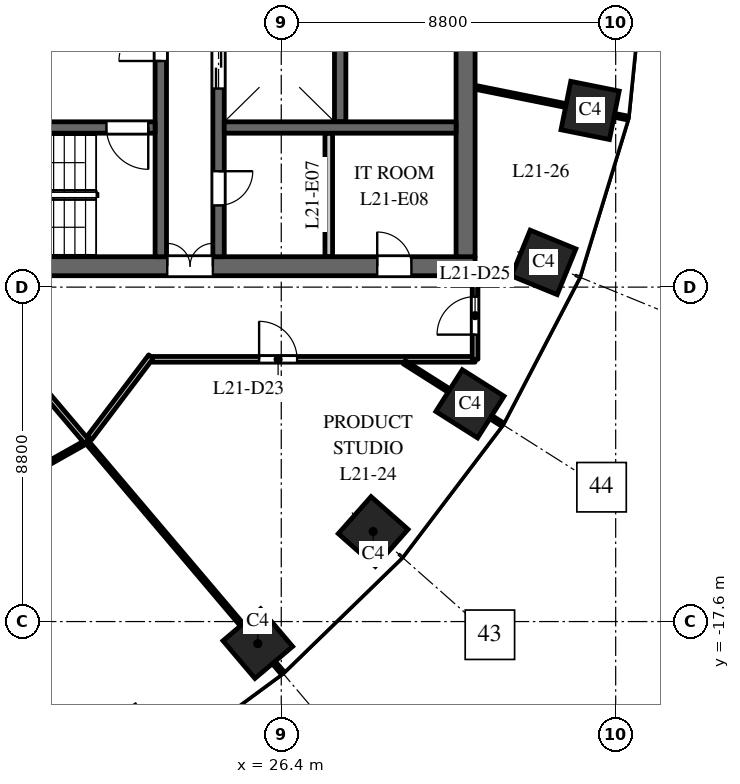
"""IFC4 building model, lengths in metres.
Left out: names, types, materials, properties, quantities, classifications, styles, units other than length and angle.
Written with IfcOpenShell. Run it as: python <this file> out.ifc"""

import sys

from ifc_helpers import new_model, si_unit, direction, frame, frame_2d, origin, origin_2d, place, context, subcontext, project, spatial, rectangle, extrude, element, fill, save


model = new_model("IFC4")
c1 = context("Model", 3, precision=1e-05, world=origin(), true_north=direction((0.0, 1.0)))
c2 = subcontext(c1, "Body", "Model", "MODEL_VIEW")
j1 = project(units=[si_unit("LENGTHUNIT", "METRE"), si_unit("PLANEANGLEUNIT", "RADIAN")], contexts=[c1])
p1 = place(None, origin())
s1 = spatial("IfcSite", under=j1, at=p1, CompositionType="ELEMENT")
p2 = place(p1, origin())
s2 = spatial("IfcBuilding", under=s1, at=p2, CompositionType="ELEMENT")
p3 = place(p2, frame((0.0, 0.0, 96.0)))
s3 = spatial("IfcBuildingStorey", under=s2, at=p3, CompositionType="ELEMENT", Elevation=96.0)
for number, where, z_axis, x_axis in (
    (1, (25.783, -18.18, 0.0), (0.0, 0.0, 1.0), (0.763, 0.646, 0.0)),
    (2, (28.819, -15.23, 0.0), (0.0, 0.0, 1.0), (0.663, 0.749, 0.0)),
    (3, (31.365, -11.871, 0.0), (0.0, 0.0, 1.0), (0.535, 0.845, 0.0)),
    (4, (33.305, -8.149, 0.0), (0.0, 0.0, 1.0), (0.379, 0.925, 0.0)),
    (5, (34.527, -4.151, 0.0), (0.0, 0.0, 1.0), (0.197, 0.98, 0.0)),
):
    element("IfcColumn", number, at=place(p3, frame(where, z_axis=z_axis, x_axis=x_axis)), inside=s3, PredefinedType="COLUMN", context=c2, shape_type="SweptSolid", body=[
        extrude(rectangle(XDim=1.3, YDim=1.3, at=origin_2d()), origin(), (0.0, 0.0, 1.0), 4.0),
    ])
p4 = place(p3, frame((16.5, -8.25, 0.0), z_axis=(0.0, 0.0, 1.0), x_axis=(1.0, 0.0, 0.0)))
e6 = element("IfcWall", 6, at=p4, inside=s3, PredefinedType="SHEAR", context=c2, shape_type="SweptSolid", body=[
    extrude(rectangle(XDim=15.0, YDim=0.5, at=frame_2d((7.5, 0.0))), origin(), (0.0, 0.0, 1.0), 3.7),
])
p5 = place(p4, frame((6.9, 0.0, 0.0)))
e7 = element("IfcOpeningElement", 7, at=p5, cuts=e6, PredefinedType="OPENING", context=c2, shape_type="SweptSolid", body=[
    extrude(rectangle(XDim=1.2, YDim=2.1, at=frame_2d((0.6, 1.05))), frame((0.0, 0.26, 0.0), z_axis=(0.0, -1.0, 0.0), x_axis=(1.0, 0.0, 0.0)), (0.0, 0.0, 1.0), 0.52),
])
p6 = place(p4, frame((12.425, 0.0, 0.0)))
e8 = element("IfcOpeningElement", 8, at=p6, cuts=e6, PredefinedType="OPENING", context=c2, shape_type="SweptSolid", body=[
    extrude(rectangle(XDim=0.9, YDim=2.1, at=frame_2d((0.45, 1.05))), frame((0.0, 0.26, 0.0), z_axis=(0.0, -1.0, 0.0), x_axis=(1.0, 0.0, 0.0)), (0.0, 0.0, 1.0), 0.52),
])
p7 = place(p3, frame((27.95, -4.45, 0.0), z_axis=(0.0, 0.0, 1.0), x_axis=(0.0, 1.0, 0.0)))
e9 = element("IfcWall", 9, at=p7, inside=s3, PredefinedType="SHEAR", context=c2, shape_type="SweptSolid", body=[
    extrude(rectangle(XDim=8.9, YDim=0.3, at=frame_2d((4.45, 0.0))), origin(), (0.0, 0.0, 1.0), 3.7),
])
p8 = place(p3, frame((24.75, -8.0, 0.0), z_axis=(0.0, 0.0, 1.0), x_axis=(0.0, 1.0, 0.0)))
e10 = element("IfcWall", 10, at=p8, inside=s3, PredefinedType="SHEAR", context=c2, shape_type="SweptSolid", body=[
    extrude(rectangle(XDim=16.0, YDim=0.3, at=frame_2d((8.0, 0.0))), origin(), (0.0, 0.0, 1.0), 3.7),
])
p9 = place(p8, frame((4.425, 0.0, 0.0)))
e11 = element("IfcOpeningElement", 11, at=p9, cuts=e10, PredefinedType="OPENING", context=c2, shape_type="SweptSolid", body=[
    extrude(rectangle(XDim=1.1, YDim=2.1, at=frame_2d((0.55, 1.05))), frame((0.0, 0.16, 0.0), z_axis=(0.0, -1.0, 0.0), x_axis=(1.0, 0.0, 0.0)), (0.0, 0.0, 1.0), 0.32),
])
p10 = place(p8, frame((7.45, 0.0, 0.0)))
e12 = element("IfcOpeningElement", 12, at=p10, cuts=e10, PredefinedType="OPENING", context=c2, shape_type="SweptSolid", body=[
    extrude(rectangle(XDim=1.1, YDim=2.1, at=frame_2d((0.55, 1.05))), frame((0.0, 0.16, 0.0), z_axis=(0.0, -1.0, 0.0), x_axis=(1.0, 0.0, 0.0)), (0.0, 0.0, 1.0), 0.32),
])
p11 = place(p8, frame((10.425, 0.0, 0.0)))
e13 = element("IfcOpeningElement", 13, at=p11, cuts=e10, PredefinedType="OPENING", context=c2, shape_type="SweptSolid", body=[
    extrude(rectangle(XDim=1.2, YDim=2.1, at=frame_2d((0.6, 1.05))), frame((0.0, 0.16, 0.0), z_axis=(0.0, -1.0, 0.0), x_axis=(1.0, 0.0, 0.0)), (0.0, 0.0, 1.0), 0.32),
])
p12 = place(p8, frame((13.75, 0.0, 0.0)))
e14 = element("IfcOpeningElement", 14, at=p12, cuts=e10, PredefinedType="OPENING", context=c2, shape_type="SweptSolid", body=[
    extrude(rectangle(XDim=0.9, YDim=2.1, at=frame_2d((0.45, 1.05))), frame((0.0, 0.16, 0.0), z_axis=(0.0, -1.0, 0.0), x_axis=(1.0, 0.0, 0.0)), (0.0, 0.0, 1.0), 0.32),
])
p13 = place(p8, frame((1.35, 0.0, 0.0)))
e15 = element("IfcOpeningElement", 15, at=p13, cuts=e10, PredefinedType="OPENING", context=c2, shape_type="SweptSolid", body=[
    extrude(rectangle(XDim=0.9, YDim=2.1, at=frame_2d((0.45, 1.05))), frame((0.0, 0.16, 0.0), z_axis=(0.0, -1.0, 0.0), x_axis=(1.0, 0.0, 0.0)), (0.0, 0.0, 1.0), 0.32),
])
p14 = place(p3, frame((31.25, -8.0, 0.0), z_axis=(0.0, 0.0, 1.0), x_axis=(0.0, 1.0, 0.0)))
e16 = element("IfcWall", 16, at=p14, inside=s3, PredefinedType="SHEAR", context=c2, shape_type="SweptSolid", body=[
    extrude(rectangle(XDim=16.0, YDim=0.5, at=frame_2d((8.0, 0.0))), origin(), (0.0, 0.0, 1.0), 3.7),
])
p15 = place(p3, frame((27.65, -8.0, 0.0), z_axis=(0.0, 0.0, 1.0), x_axis=(0.0, 1.0, 0.0)))
e17 = element("IfcWall", 17, at=p15, inside=s3, PredefinedType="PARTITIONING", context=c2, shape_type="SweptSolid", body=[
    extrude(rectangle(XDim=3.25, YDim=0.2, at=frame_2d((1.625, 0.0))), origin(), (0.0, 0.0, 1.0), 3.7),
])
p16 = place(p3, frame((24.9, -4.6, 0.0), z_axis=(0.0, 0.0, 1.0), x_axis=(1.0, 0.0, 0.0)))
e18 = element("IfcWall", 18, at=p16, inside=s3, PredefinedType="SHEAR", context=c2, shape_type="SweptSolid", body=[
    extrude(rectangle(XDim=6.1, YDim=0.3, at=frame_2d((3.05, 0.0))), origin(), (0.0, 0.0, 1.0), 3.7),
])
p17 = place(p3, frame((23.23, -8.0, 0.0), z_axis=(0.0, 0.0, 1.0), x_axis=(0.0, 1.0, 0.0)))
e19 = element("IfcWall", 19, at=p17, inside=s3, PredefinedType="SHEAR", context=c2, shape_type="SweptSolid", body=[
    extrude(rectangle(XDim=7.875, YDim=0.3, at=frame_2d((3.938, 0.0))), origin(), (0.0, 0.0, 1.0), 3.7),
])
p18 = place(p17, frame((5.15, 0.0, 0.0)))
e20 = element("IfcOpeningElement", 20, at=p18, cuts=e19, PredefinedType="OPENING", context=c2, shape_type="SweptSolid", body=[
    extrude(rectangle(XDim=1.1, YDim=2.1, at=frame_2d((0.55, 1.05))), frame((0.0, 0.16, 0.0), z_axis=(0.0, -1.0, 0.0), x_axis=(1.0, 0.0, 0.0)), (0.0, 0.0, 1.0), 0.32),
])
p19 = place(p3, frame((16.9, -4.6, 0.0), z_axis=(0.0, 0.0, 1.0), x_axis=(1.0, 0.0, 0.0)))
e21 = element("IfcWall", 21, at=p19, inside=s3, PredefinedType="SHEAR", context=c2, shape_type="SweptSolid", body=[
    extrude(rectangle(XDim=6.18, YDim=0.3, at=frame_2d((3.09, 0.0))), origin(), (0.0, 0.0, 1.0), 3.7),
])
p20 = place(p19, frame((4.9, 0.0, 0.0)))
e22 = element("IfcOpeningElement", 22, at=p20, cuts=e21, PredefinedType="OPENING", context=c2, shape_type="SweptSolid", body=[
    extrude(rectangle(XDim=1.1, YDim=2.1, at=frame_2d((0.55, 1.05))), frame((0.0, 0.16, 0.0), z_axis=(0.0, -1.0, 0.0), x_axis=(1.0, 0.0, 0.0)), (0.0, 0.0, 1.0), 0.32),
])
p21 = place(p3, frame((12.478, -17.822, 0.0), z_axis=(0.0, 0.0, 1.0), x_axis=(0.871366973315, 0.490631835306, 0.0)))
e23 = element("IfcWall", 23, at=p21, inside=s3, PredefinedType="PARTITIONING", context=c2, shape_type="SweptSolid", body=[
    extrude(rectangle(XDim=10.101, YDim=0.1, at=frame_2d((5.051, 0.0))), origin(), (0.0, 0.0, 1.0), 3.7),
])
p22 = place(p3, frame((19.511, -10.778, 0.0), z_axis=(0.0, 0.0, 1.0), x_axis=(0.64641426768, -0.762986628021, 0.0)))
e24 = element("IfcWall", 24, at=p22, inside=s3, PredefinedType="PARTITIONING", context=c2, shape_type="SweptSolid", body=[
    extrude(rectangle(XDim=2.735, YDim=0.15, at=frame_2d((1.368, 0.0))), origin(), (0.0, 0.0, 1.0), 3.7),
])
p23 = place(p3, frame((21.355, -12.765, 0.0), z_axis=(0.0, 0.0, 1.0), x_axis=(0.603391001626, 0.797445483502, 0.0)))
e25 = element("IfcWall", 25, at=p23, inside=s3, PredefinedType="PARTITIONING", context=c2, shape_type="SweptSolid", body=[
    extrude(rectangle(XDim=2.68, YDim=0.15, at=frame_2d((1.34, 0.0))), origin(), (0.0, 0.0, 1.0), 2.75),
])
p24 = place(p3, frame((21.279, -12.865, 0.0), z_axis=(0.0, 0.0, 1.0), x_axis=(0.646395355102, -0.763002650652, 0.0)))
e26 = element("IfcWall", 26, at=p24, inside=s3, PredefinedType="PARTITIONING", context=c2, shape_type="SweptSolid", body=[
    extrude(rectangle(XDim=7.969, YDim=0.1, at=frame_2d((3.984, 0.0))), origin(), (0.0, 0.0, 1.0), 2.9),
])
p25 = place(p3, frame((23.011, -10.7, 0.0), z_axis=(0.0, 0.0, 1.0), x_axis=(1.0, 0.0, 0.0)))
e27 = element("IfcWall", 27, at=p25, inside=s3, PredefinedType="PARTITIONING", context=c2, shape_type="SweptSolid", body=[
    extrude(rectangle(XDim=8.489, YDim=0.15, at=frame_2d((4.245, 0.0))), origin(), (0.0, 0.0, 1.0), 2.9),
])
p26 = place(p25, frame((2.806, 0.0, 0.0)))
e28 = element("IfcOpeningElement", 28, at=p26, cuts=e27, PredefinedType="OPENING", context=c2, shape_type="SweptSolid", body=[
    extrude(rectangle(XDim=1.0, YDim=2.1, at=frame_2d((0.5, 1.05))), frame((0.0, 0.085, 0.0), z_axis=(0.0, -1.0, 0.0), x_axis=(1.0, 0.0, 0.0)), (0.0, 0.0, 1.0), 0.17),
])
p27 = place(p3, frame((29.637, -10.777, 0.0), z_axis=(0.0, 0.0, 1.0), x_axis=(0.844810627195, -0.535065420467, 0.0)))
e29 = element("IfcWall", 29, at=p27, inside=s3, PredefinedType="PARTITIONING", context=c2, shape_type="SweptSolid", body=[
    extrude(rectangle(XDim=3.048, YDim=0.1, at=frame_2d((1.524, 0.0))), origin(), (0.0, 0.0, 1.0), 2.9),
])
p28 = place(p3, frame((31.5, -10.7, 0.0), z_axis=(0.0, 0.0, 1.0), x_axis=(0.0, 1.0, 0.0)))
e30 = element("IfcWall", 30, at=p28, inside=s3, PredefinedType="PARTITIONING", context=c2, shape_type="SweptSolid", body=[
    extrude(rectangle(XDim=2.2, YDim=0.15, at=frame_2d((1.1, 0.0))), origin(), (0.0, 0.0, 1.0), 2.9),
])
p29 = place(p28, frame((0.65, 0.0, 0.0)))
e31 = element("IfcOpeningElement", 31, at=p29, cuts=e30, PredefinedType="OPENING", context=c2, shape_type="SweptSolid", body=[
    extrude(rectangle(XDim=1.0, YDim=2.1, at=frame_2d((0.5, 1.05))), frame((0.0, 0.085, 0.0), z_axis=(0.0, -1.0, 0.0), x_axis=(1.0, 0.0, 0.0)), (0.0, 0.0, 1.0), 0.17),
])
p30 = place(p3, frame((31.5, -3.542, 0.0), z_axis=(0.0, 0.0, 1.0), x_axis=(0.980357474535, -0.197228857227, 0.0)))
e32 = element("IfcWall", 32, at=p30, inside=s3, PredefinedType="PARTITIONING", context=c2, shape_type="SweptSolid", body=[
    extrude(rectangle(XDim=4.092, YDim=0.1, at=frame_2d((2.046, 0.0))), origin(), (0.0, 0.0, 1.0), 2.9),
])
p31 = place(p9, origin())
e33 = element("IfcDoor", 33, at=p31, inside=s3, OperationType="DOUBLE_DOOR_SLIDING", PredefinedType="DOOR", context=c2, shape_type="SweptSolid", body=[
    extrude(rectangle(XDim=1.1, YDim=2.1, at=frame_2d((0.55, 1.05))), frame((0.0, 0.025, 0.0), z_axis=(0.0, -1.0, 0.0), x_axis=(1.0, 0.0, 0.0)), (0.0, 0.0, 1.0), 0.05),
])
fill(e11, e33)
p32 = place(p20, origin())
e34 = element("IfcDoor", 34, at=p32, inside=s3, OperationType="SINGLE_SWING_RIGHT", PredefinedType="DOOR", context=c2, shape_type="SweptSolid", body=[
    extrude(rectangle(XDim=1.1, YDim=2.1, at=frame_2d((0.55, 1.05))), frame((0.0, 0.025, 0.0), z_axis=(0.0, -1.0, 0.0), x_axis=(1.0, 0.0, 0.0)), (0.0, 0.0, 1.0), 0.05),
])
fill(e22, e34)
p33 = place(p18, origin())
e35 = element("IfcDoor", 35, at=p33, inside=s3, OperationType="SINGLE_SWING_RIGHT", PredefinedType="DOOR", context=c2, shape_type="SweptSolid", body=[
    extrude(rectangle(XDim=1.1, YDim=2.1, at=frame_2d((0.55, 1.05))), frame((0.0, 0.025, 0.0), z_axis=(0.0, -1.0, 0.0), x_axis=(1.0, 0.0, 0.0)), (0.0, 0.0, 1.0), 0.05),
])
fill(e20, e35)
p34 = place(p5, origin())
e36 = element("IfcDoor", 36, at=p34, inside=s3, OperationType="DOUBLE_DOOR_DOUBLE_SWING", PredefinedType="DOOR", context=c2, shape_type="SweptSolid", body=[
    extrude(rectangle(XDim=1.2, YDim=2.1, at=frame_2d((0.6, 1.05))), frame((0.0, 0.025, 0.0), z_axis=(0.0, -1.0, 0.0), x_axis=(1.0, 0.0, 0.0)), (0.0, 0.0, 1.0), 0.05),
])
fill(e7, e36)
p35 = place(p13, origin())
e37 = element("IfcDoor", 37, at=p35, inside=s3, OperationType="SINGLE_SWING_RIGHT", PredefinedType="DOOR", context=c2, shape_type="SweptSolid", body=[
    extrude(rectangle(XDim=0.9, YDim=2.1, at=frame_2d((0.45, 1.05))), frame((0.0, 0.025, 0.0), z_axis=(0.0, -1.0, 0.0), x_axis=(1.0, 0.0, 0.0)), (0.0, 0.0, 1.0), 0.05),
])
fill(e15, e37)
p36 = place(p6, origin())
e38 = element("IfcDoor", 38, at=p36, inside=s3, OperationType="SINGLE_SWING_RIGHT", PredefinedType="DOOR", context=c2, shape_type="SweptSolid", body=[
    extrude(rectangle(XDim=0.9, YDim=2.1, at=frame_2d((0.45, 1.05))), frame((0.0, 0.025, 0.0), z_axis=(0.0, -1.0, 0.0), x_axis=(1.0, 0.0, 0.0)), (0.0, 0.0, 1.0), 0.05),
])
fill(e8, e38)
p37 = place(p26, origin())
e39 = element("IfcDoor", 39, at=p37, inside=s3, OperationType="SINGLE_SWING_LEFT", PredefinedType="DOOR", context=c2, shape_type="SweptSolid", body=[
    extrude(rectangle(XDim=1.0, YDim=2.1, at=frame_2d((0.5, 1.05))), frame((0.0, 0.025, 0.0), z_axis=(0.0, -1.0, 0.0), x_axis=(1.0, 0.0, 0.0)), (0.0, 0.0, 1.0), 0.05),
])
fill(e28, e39)
p38 = place(p29, origin())
e40 = element("IfcDoor", 40, at=p38, inside=s3, OperationType="SINGLE_SWING_LEFT", PredefinedType="DOOR", context=c2, shape_type="SweptSolid", body=[
    extrude(rectangle(XDim=1.0, YDim=2.1, at=frame_2d((0.5, 1.05))), frame((0.0, 0.025, 0.0), z_axis=(0.0, -1.0, 0.0), x_axis=(1.0, 0.0, 0.0)), (0.0, 0.0, 1.0), 0.05),
])
fill(e31, e40)
save(model, sys.argv[1])
